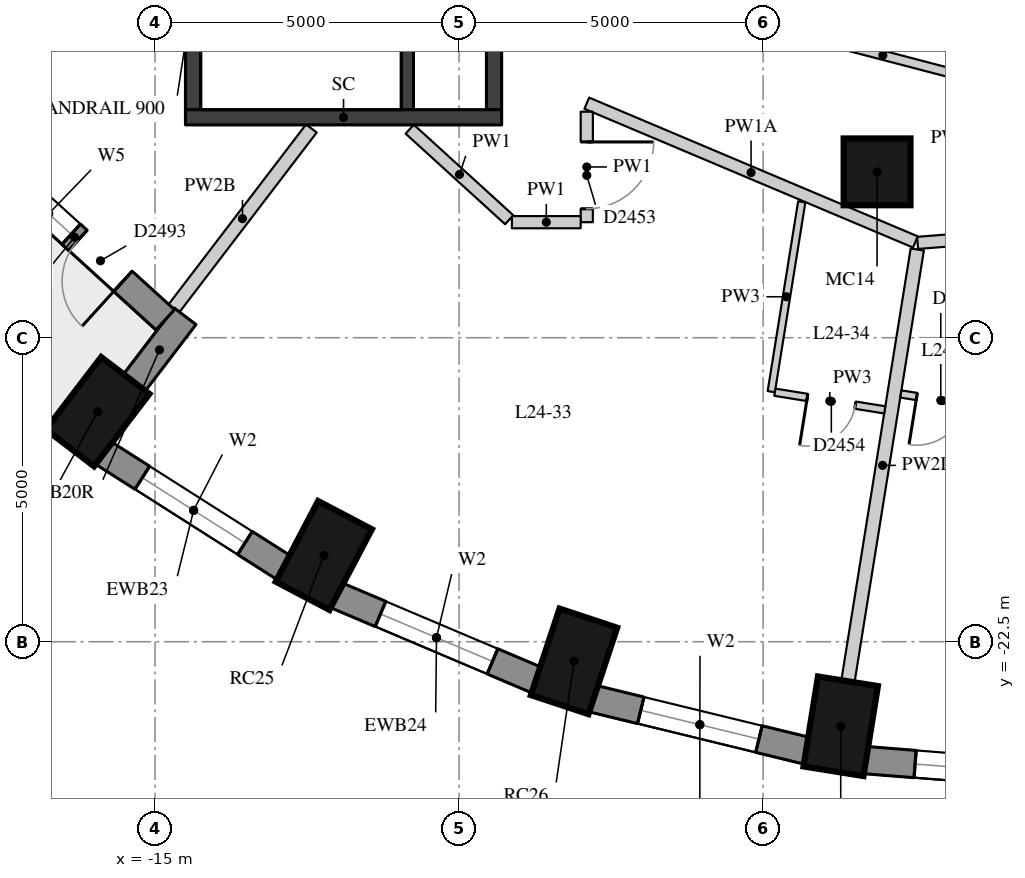
"""IFC4 building model, lengths in metres.
Left out: names, types, materials, properties, quantities, classifications, styles, units other than length and angle.
Written with IfcOpenShell. Run it as: python <this file> out.ifc"""

import sys

from ifc_helpers import new_model, si_unit, direction, frame, frame_2d, origin, origin_2d, place, context, subcontext, project, spatial, rectangle, extrude, element, fill, save


model = new_model("IFC4")
c1 = context("Model", 3, precision=1e-05, world=origin(), true_north=direction((0.0, 1.0)))
c2 = subcontext(c1, "Body", "Model", "MODEL_VIEW")
j1 = project(units=[si_unit("LENGTHUNIT", "METRE"), si_unit("PLANEANGLEUNIT", "RADIAN")], contexts=[c1])
p1 = place(None, origin())
s1 = spatial("IfcSite", under=j1, at=p1, CompositionType="ELEMENT")
p2 = place(p1, origin())
s2 = spatial("IfcBuilding", under=s1, at=p2, CompositionType="ELEMENT")
p3 = place(p2, frame((0.0, 0.0, 88.9)))
s3 = spatial("IfcBuildingStorey", under=s2, at=p3, CompositionType="ELEMENT", Elevation=88.9)
for number, where, z_axis, x_axis in (
    (1, (-15.945, -18.717, 0.0), (0.0, 0.0, 1.0), (-0.607, -0.795, 0.0)),
    (2, (-12.225, -21.082, 0.0), (0.0, 0.0, 1.0), (-0.465, -0.885, 0.0)),
    (3, (-8.11, -22.824, 0.0), (0.0, 0.0, 1.0), (-0.315, -0.949, 0.0)),
    (4, (-3.724, -23.891, 0.0), (0.0, 0.0, 1.0), (-0.159, -0.987, 0.0)),
):
    element("IfcColumn", number, at=place(p3, frame(where, z_axis=z_axis, x_axis=x_axis)), inside=s3, PredefinedType="COLUMN", context=c2, shape_type="SweptSolid", body=[
        extrude(rectangle(XDim=1.5, YDim=1.0, at=origin_2d()), origin(), (0.0, 0.0, 1.0), 3.3),
    ])
p4 = place(p3, frame((-3.126, -14.772, 0.0), z_axis=(0.0, 0.0, 1.0), x_axis=(1.0, 0.0, 0.0)))
e5 = element("IfcColumn", 5, at=p4, inside=s3, PredefinedType="COLUMN", context=c2, shape_type="SweptSolid", body=[
    extrude(rectangle(XDim=1.1, YDim=1.1, at=origin_2d()), origin(), (0.0, 0.0, 1.0), 3.3),
])
p5 = place(p3, frame((-15.856, -19.392, 0.0), z_axis=(0.0, 0.0, 1.0), x_axis=(0.843891947083, -0.53651317006, 0.0)))
e6 = element("IfcWall", 6, at=p5, inside=s3, PredefinedType="SOLIDWALL", context=c2, shape_type="SweptSolid", body=[
    extrude(rectangle(XDim=3.532, YDim=0.45, at=frame_2d((1.766, 0.0))), origin(), (0.0, 0.0, 1.0), 3.02),
])
p6 = place(p5, frame((0.766, 0.0, 0.4)))
e7 = element("IfcOpeningElement", 7, at=p6, cuts=e6, PredefinedType="OPENING", context=c2, shape_type="SweptSolid", body=[
    extrude(rectangle(XDim=2.0, YDim=1.75, at=frame_2d((1.0, 0.875))), frame((0.0, 0.235, 0.0), z_axis=(0.0, -1.0, 0.0), x_axis=(1.0, 0.0, 0.0)), (0.0, 0.0, 1.0), 0.47),
])
p7 = place(p3, frame((-12.025, -21.733, 0.0), z_axis=(0.0, 0.0, 1.0), x_axis=(0.920879975612, -0.389846213932, 0.0)))
e8 = element("IfcWall", 8, at=p7, inside=s3, PredefinedType="SOLIDWALL", context=c2, shape_type="SweptSolid", body=[
    extrude(rectangle(XDim=3.592, YDim=0.45, at=frame_2d((1.796, 0.0))), origin(), (0.0, 0.0, 1.0), 3.02),
])
p8 = place(p7, frame((0.796, 0.0, 0.4)))
e9 = element("IfcOpeningElement", 9, at=p8, cuts=e8, PredefinedType="OPENING", context=c2, shape_type="SweptSolid", body=[
    extrude(rectangle(XDim=2.0, YDim=1.75, at=frame_2d((1.0, 0.875))), frame((0.0, 0.235, 0.0), z_axis=(0.0, -1.0, 0.0), x_axis=(1.0, 0.0, 0.0)), (0.0, 0.0, 1.0), 0.47),
])
p9 = place(p3, frame((-7.807, -23.435, 0.0), z_axis=(0.0, 0.0, 1.0), x_axis=(0.971667603162, -0.236351579148, 0.0)))
e10 = element("IfcWall", 10, at=p9, inside=s3, PredefinedType="SOLIDWALL", context=c2, shape_type="SweptSolid", body=[
    extrude(rectangle(XDim=3.635, YDim=0.45, at=frame_2d((1.817, 0.0))), origin(), (0.0, 0.0, 1.0), 3.02),
])
p10 = place(p9, frame((0.817, 0.0, 0.4)))
e11 = element("IfcOpeningElement", 11, at=p10, cuts=e10, PredefinedType="OPENING", context=c2, shape_type="SweptSolid", body=[
    extrude(rectangle(XDim=2.0, YDim=1.75, at=frame_2d((1.0, 0.875))), frame((0.0, 0.235, 0.0), z_axis=(0.0, -1.0, 0.0), x_axis=(1.0, 0.0, 0.0)), (0.0, 0.0, 1.0), 0.47),
])
p11 = place(p3, frame((-3.327, -24.447, 0.0), z_axis=(0.0, 0.0, 1.0), x_axis=(0.996862216754, -0.079156306178, 0.0)))
e12 = element("IfcWall", 12, at=p11, inside=s3, PredefinedType="SOLIDWALL", context=c2, shape_type="SweptSolid", body=[
    extrude(rectangle(XDim=3.658, YDim=0.45, at=frame_2d((1.829, 0.0))), origin(), (0.0, 0.0, 1.0), 3.02),
])
p12 = place(p11, frame((0.829, 0.0, 0.4)))
e13 = element("IfcOpeningElement", 13, at=p12, cuts=e12, PredefinedType="OPENING", context=c2, shape_type="SweptSolid", body=[
    extrude(rectangle(XDim=2.0, YDim=1.75, at=frame_2d((1.0, 0.875))), frame((0.0, 0.235, 0.0), z_axis=(0.0, -1.0, 0.0), x_axis=(1.0, 0.0, 0.0)), (0.0, 0.0, 1.0), 0.47),
])
p13 = place(p3, frame((-15.35, -18.253, 0.0), z_axis=(0.0, 0.0, 1.0), x_axis=(0.607026495834, 0.794681592435, 0.0)))
e14 = element("IfcWall", 14, at=p13, inside=s3, PredefinedType="SOLIDWALL", context=c2, shape_type="SweptSolid", body=[
    extrude(rectangle(XDim=1.391, YDim=0.45, at=frame_2d((0.695, 0.0))), origin(), (0.0, 0.0, 1.0), 2.57),
])
p14 = place(p3, frame((-17.814, -14.491, 0.0), z_axis=(0.0, 0.0, 1.0), x_axis=(0.73951517403, -0.673139886933, 0.0)))
e15 = element("IfcWall", 15, at=p14, inside=s3, PredefinedType="SOLIDWALL", context=c2, shape_type="SweptSolid", body=[
    extrude(rectangle(XDim=4.031, YDim=0.45, at=frame_2d((2.016, 0.0))), origin(), (0.0, 0.0, 1.0), 3.02),
])
p15 = place(p14, frame((0.941, 0.0, 0.4)))
e16 = element("IfcOpeningElement", 16, at=p15, cuts=e15, PredefinedType="OPENING", context=c2, shape_type="SweptSolid", body=[
    extrude(rectangle(XDim=1.0, YDim=1.75, at=frame_2d((0.5, 0.875))), frame((0.0, 0.235, 0.0), z_axis=(0.0, -1.0, 0.0), x_axis=(1.0, 0.0, 0.0)), (0.0, 0.0, 1.0), 0.47),
])
p16 = place(p14, frame((2.091, 0.0, 0.0)))
e17 = element("IfcOpeningElement", 17, at=p16, cuts=e15, PredefinedType="OPENING", context=c2, shape_type="SweptSolid", body=[
    extrude(rectangle(XDim=1.0, YDim=2.15, at=frame_2d((0.5, 1.075))), frame((0.0, 0.235, 0.0), z_axis=(0.0, -1.0, 0.0), x_axis=(1.0, 0.0, 0.0)), (0.0, 0.0, 1.0), 0.47),
])
p17 = place(p3, frame((-10.85, -13.75, 0.0), z_axis=(0.0, 0.0, 1.0), x_axis=(0.0, 1.0, 0.0)))
e18 = element("IfcWall", 18, at=p17, inside=s3, PredefinedType="SHEAR", context=c2, shape_type="SweptSolid", body=[
    extrude(rectangle(XDim=6.0, YDim=0.2, at=frame_2d((3.0, 0.0))), origin(), (0.0, 0.0, 1.0), 3.02),
])
p18 = place(p17, frame((4.4, 0.0, 0.0)))
e19 = element("IfcOpeningElement", 19, at=p18, cuts=e18, PredefinedType="OPENING", context=c2, shape_type="SweptSolid", body=[
    extrude(rectangle(XDim=1.5, YDim=2.1, at=frame_2d((0.75, 1.05))), frame((0.0, 0.11, 0.0), z_axis=(0.0, -1.0, 0.0), x_axis=(1.0, 0.0, 0.0)), (0.0, 0.0, 1.0), 0.22),
])
p19 = place(p3, frame((-14.375, -13.75, -0.28), z_axis=(0.0, 0.0, 1.0), x_axis=(0.0, 1.0, 0.0)))
e20 = element("IfcWall", 20, at=p19, inside=s3, PredefinedType="SHEAR", context=c2, shape_type="SweptSolid", body=[
    extrude(rectangle(XDim=6.0, YDim=0.25, at=frame_2d((3.0, 0.0))), origin(), (0.0, 0.0, 1.0), 3.3),
])
p20 = place(p3, frame((-9.425, -13.75, -0.28), z_axis=(0.0, 0.0, 1.0), x_axis=(0.0, 1.0, 0.0)))
e21 = element("IfcWall", 21, at=p20, inside=s3, PredefinedType="SHEAR", context=c2, shape_type="SweptSolid", body=[
    extrude(rectangle(XDim=6.0, YDim=0.25, at=frame_2d((3.0, 0.0))), origin(), (0.0, 0.0, 1.0), 3.3),
])
p21 = place(p20, frame((2.4, 0.0, 0.28)))
e22 = element("IfcOpeningElement", 22, at=p21, cuts=e21, PredefinedType="OPENING", context=c2, shape_type="SweptSolid", body=[
    extrude(rectangle(XDim=1.5, YDim=2.1, at=frame_2d((0.75, 1.05))), frame((0.0, 0.135, 0.0), z_axis=(0.0, -1.0, 0.0), x_axis=(1.0, 0.0, 0.0)), (0.0, 0.0, 1.0), 0.27),
])
p22 = place(p3, frame((-14.5, -13.875, -0.28), z_axis=(0.0, 0.0, 1.0), x_axis=(1.0, 0.0, 0.0)))
e23 = element("IfcWall", 23, at=p22, inside=s3, PredefinedType="SHEAR", context=c2, shape_type="SweptSolid", body=[
    extrude(rectangle(XDim=5.2, YDim=0.25, at=frame_2d((2.6, 0.0))), origin(), (0.0, 0.0, 1.0), 3.3),
])
p23 = place(p3, frame((7.158, -15.178, 0.0), z_axis=(0.0, 0.0, 1.0), x_axis=(-0.996871915552, -0.0790340685, 0.0)))
e24 = element("IfcWall", 24, at=p23, inside=s3, PredefinedType="PARTITIONING", context=c2, shape_type="SweptSolid", body=[
    extrude(rectangle(XDim=9.647, YDim=0.2, at=frame_2d((4.824, 0.0))), origin(), (0.0, 0.0, 1.0), 3.02),
])
p24 = place(p23, frame((6.588, 0.0, 0.0)))
e25 = element("IfcOpeningElement", 25, at=p24, cuts=e24, PredefinedType="OPENING", context=c2, shape_type="SweptSolid", body=[
    extrude(rectangle(XDim=1.0, YDim=2.1, at=frame_2d((0.5, 1.05))), frame((0.0, 0.11, 0.0), z_axis=(0.0, -1.0, 0.0), x_axis=(1.0, 0.0, 0.0)), (0.0, 0.0, 1.0), 0.22),
])
p25 = place(p23, frame((4.855, 0.0, 0.0)))
e26 = element("IfcOpeningElement", 26, at=p25, cuts=e24, PredefinedType="OPENING", context=c2, shape_type="SweptSolid", body=[
    extrude(rectangle(XDim=0.9, YDim=2.1, at=frame_2d((0.45, 1.05))), frame((0.0, 0.11, 0.0), z_axis=(0.0, -1.0, 0.0), x_axis=(1.0, 0.0, 0.0)), (0.0, 0.0, 1.0), 0.22),
])
p26 = place(p23, frame((0.22, 0.0, 0.0)))
e27 = element("IfcOpeningElement", 27, at=p26, cuts=e24, PredefinedType="OPENING", context=c2, shape_type="SweptSolid", body=[
    extrude(rectangle(XDim=1.1, YDim=2.1, at=frame_2d((0.55, 1.05))), frame((0.0, 0.11, 0.0), z_axis=(0.0, -1.0, 0.0), x_axis=(1.0, 0.0, 0.0)), (0.0, 0.0, 1.0), 0.22),
])
p27 = place(p3, frame((-2.496, -15.925, 0.0), z_axis=(0.0, 0.0, 1.0), x_axis=(-0.921239287596, 0.388996368864, 0.0)))
e28 = element("IfcWall", 28, at=p27, inside=s3, PredefinedType="PARTITIONING", context=c2, shape_type="SweptSolid", body=[
    extrude(rectangle(XDim=5.866, YDim=0.2, at=frame_2d((2.933, 0.0))), origin(), (0.0, 0.0, 1.0), 2.57),
])
p28 = place(p3, frame((-7.9, -13.783, 0.0), z_axis=(0.0, 0.0, 1.0), x_axis=(0.0, -1.0, 0.0)))
e29 = element("IfcWall", 29, at=p28, inside=s3, PredefinedType="PARTITIONING", context=c2, shape_type="SweptSolid", body=[
    extrude(rectangle(XDim=1.817, YDim=0.2, at=frame_2d((0.908, 0.0))), origin(), (0.0, 0.0, 1.0), 3.02),
])
p29 = place(p28, frame((0.497, 0.0, 0.0)))
e30 = element("IfcOpeningElement", 30, at=p29, cuts=e29, PredefinedType="OPENING", context=c2, shape_type="SweptSolid", body=[
    extrude(rectangle(XDim=1.1, YDim=2.1, at=frame_2d((0.55, 1.05))), frame((0.0, 0.11, 0.0), z_axis=(0.0, -1.0, 0.0), x_axis=(1.0, 0.0, 0.0)), (0.0, 0.0, 1.0), 0.22),
])
p30 = place(p3, frame((-8.0, -15.6, 0.0), z_axis=(0.0, 0.0, 1.0), x_axis=(-1.0, 0.0, 0.0)))
e31 = element("IfcWall", 31, at=p30, inside=s3, PredefinedType="PARTITIONING", context=c2, shape_type="SweptSolid", body=[
    extrude(rectangle(XDim=1.131, YDim=0.2, at=frame_2d((0.565, 0.0))), origin(), (0.0, 0.0, 1.0), 3.02),
])
p31 = place(p3, frame((-9.176, -15.56, 0.0), z_axis=(0.0, 0.0, 1.0), x_axis=(-0.73943556447, 0.673227336044, 0.0)))
e32 = element("IfcWall", 32, at=p31, inside=s3, PredefinedType="PARTITIONING", context=c2, shape_type="SweptSolid", body=[
    extrude(rectangle(XDim=2.212, YDim=0.2, at=frame_2d((1.106, 0.0))), origin(), (0.0, 0.0, 1.0), 3.02),
])
p32 = place(p3, frame((-1.644, -13.217, 0.0), z_axis=(0.0, 0.0, 1.0), x_axis=(-0.967446197993, 0.253076774891, 0.0)))
e33 = element("IfcWall", 33, at=p32, inside=s3, PredefinedType="PARTITIONING", context=c2, shape_type="SweptSolid", body=[
    extrude(rectangle(XDim=2.868, YDim=0.15, at=frame_2d((1.434, 0.0))), origin(), (0.0, 0.0, 1.0), 3.02),
])
p33 = place(p3, frame((-14.696, -17.025, 0.0), z_axis=(0.0, 0.0, 1.0), x_axis=(0.607059278405, 0.794656550028, 0.0)))
e34 = element("IfcWall", 34, at=p33, inside=s3, PredefinedType="PARTITIONING", context=c2, shape_type="SweptSolid", body=[
    extrude(rectangle(XDim=3.734, YDim=0.22, at=frame_2d((1.867, 0.0))), origin(), (0.0, 0.0, 1.0), 2.57),
])
p34 = place(p3, frame((-3.605, -23.15, 0.0), z_axis=(0.0, 0.0, 1.0), x_axis=(0.158533314299, 0.987353628776, 0.0)))
e35 = element("IfcWall", 35, at=p34, inside=s3, PredefinedType="PARTITIONING", context=c2, shape_type="SweptSolid", body=[
    extrude(rectangle(XDim=7.192, YDim=0.22, at=frame_2d((3.596, 0.0))), origin(), (0.0, 0.0, 1.0), 2.47),
])
p35 = place(p3, frame((-4.365, -15.266, 0.0), z_axis=(0.0, 0.0, 1.0), x_axis=(-0.158535604942, -0.987353260979, 0.0)))
e36 = element("IfcWall", 36, at=p35, inside=s3, PredefinedType="PARTITIONING", context=c2, shape_type="SweptSolid", body=[
    extrude(rectangle(XDim=3.162, YDim=0.12, at=frame_2d((1.581, 0.0))), origin(), (0.0, 0.0, 1.0), 3.02),
])
p36 = place(p3, frame((-4.806, -18.397, 0.0), z_axis=(0.0, 0.0, 1.0), x_axis=(0.987339700129, -0.158620038299, 0.0)))
e37 = element("IfcWall", 37, at=p36, inside=s3, PredefinedType="PARTITIONING", context=c2, shape_type="SweptSolid", body=[
    extrude(rectangle(XDim=1.83, YDim=0.12, at=frame_2d((0.915, 0.0))), origin(), (0.0, 0.0, 1.0), 3.02),
])
p37 = place(p36, frame((0.54, 0.0, 0.0)))
e38 = element("IfcOpeningElement", 38, at=p37, cuts=e37, PredefinedType="OPENING", context=c2, shape_type="SweptSolid", body=[
    extrude(rectangle(XDim=0.8, YDim=2.1, at=frame_2d((0.4, 1.05))), frame((0.0, 0.07, 0.0), z_axis=(0.0, -1.0, 0.0), x_axis=(1.0, 0.0, 0.0)), (0.0, 0.0, 1.0), 0.14),
])
p38 = place(p3, frame((-1.372, -18.644, 0.0), z_axis=(0.0, 0.0, 1.0), x_axis=(-0.987324430422, 0.158715056288, 0.0)))
e39 = element("IfcWall", 39, at=p38, inside=s3, PredefinedType="PARTITIONING", context=c2, shape_type="SweptSolid", body=[
    extrude(rectangle(XDim=1.38, YDim=0.12, at=frame_2d((0.69, 0.0))), origin(), (0.0, 0.0, 1.0), 3.02),
])
p39 = place(p38, frame((0.315, 0.0, 0.0)))
e40 = element("IfcOpeningElement", 40, at=p39, cuts=e39, PredefinedType="OPENING", context=c2, shape_type="SweptSolid", body=[
    extrude(rectangle(XDim=0.8, YDim=2.1, at=frame_2d((0.4, 1.05))), frame((0.0, 0.07, 0.0), z_axis=(0.0, -1.0, 0.0), x_axis=(1.0, 0.0, 0.0)), (0.0, 0.0, 1.0), 0.14),
])
p40 = place(p6, origin())
e41 = element("IfcWindow", 41, at=p40, inside=s3, PartitioningType="SINGLE_PANEL", PredefinedType="WINDOW", context=c2, shape_type="SweptSolid", body=[
    extrude(rectangle(XDim=2.0, YDim=1.75, at=frame_2d((1.0, 0.875))), frame((0.0, 0.035, 0.0), z_axis=(0.0, -1.0, 0.0), x_axis=(1.0, 0.0, 0.0)), (0.0, 0.0, 1.0), 0.06),
])
fill(e7, e41)
p41 = place(p8, origin())
e42 = element("IfcWindow", 42, at=p41, inside=s3, PartitioningType="SINGLE_PANEL", PredefinedType="WINDOW", context=c2, shape_type="SweptSolid", body=[
    extrude(rectangle(XDim=2.0, YDim=1.75, at=frame_2d((1.0, 0.875))), frame((0.0, 0.035, 0.0), z_axis=(0.0, -1.0, 0.0), x_axis=(1.0, 0.0, 0.0)), (0.0, 0.0, 1.0), 0.06),
])
fill(e9, e42)
p42 = place(p10, origin())
e43 = element("IfcWindow", 43, at=p42, inside=s3, PartitioningType="SINGLE_PANEL", PredefinedType="WINDOW", context=c2, shape_type="SweptSolid", body=[
    extrude(rectangle(XDim=2.0, YDim=1.75, at=frame_2d((1.0, 0.875))), frame((0.0, 0.035, 0.0), z_axis=(0.0, -1.0, 0.0), x_axis=(1.0, 0.0, 0.0)), (0.0, 0.0, 1.0), 0.06),
])
fill(e11, e43)
p43 = place(p12, origin())
e44 = element("IfcWindow", 44, at=p43, inside=s3, PartitioningType="SINGLE_PANEL", PredefinedType="WINDOW", context=c2, shape_type="SweptSolid", body=[
    extrude(rectangle(XDim=2.0, YDim=1.75, at=frame_2d((1.0, 0.875))), frame((0.0, 0.035, 0.0), z_axis=(0.0, -1.0, 0.0), x_axis=(1.0, 0.0, 0.0)), (0.0, 0.0, 1.0), 0.06),
])
fill(e13, e44)
p44 = place(p15, origin())
e45 = element("IfcWindow", 45, at=p44, inside=s3, PartitioningType="SINGLE_PANEL", PredefinedType="WINDOW", context=c2, shape_type="SweptSolid", body=[
    extrude(rectangle(XDim=1.0, YDim=1.75, at=frame_2d((0.5, 0.875))), frame((0.0, 0.035, 0.0), z_axis=(0.0, -1.0, 0.0), x_axis=(1.0, 0.0, 0.0)), (0.0, 0.0, 1.0), 0.06),
])
fill(e16, e45)
p45 = place(p16, frame((1.0, 0.0, 0.0), z_axis=(0.0, 0.0, 1.0), x_axis=(-1.0, 0.0, 0.0)))
e46 = element("IfcDoor", 46, at=p45, inside=s3, OperationType="SINGLE_SWING_LEFT", PredefinedType="DOOR", context=c2, shape_type="SweptSolid", body=[
    extrude(rectangle(XDim=1.0, YDim=2.15, at=frame_2d((0.5, 1.075))), frame((0.0, 0.075, 0.0), z_axis=(0.0, -1.0, 0.0), x_axis=(1.0, 0.0, 0.0)), (0.0, 0.0, 1.0), 0.05),
])
fill(e17, e46)
p46 = place(p29, origin())
e47 = element("IfcDoor", 47, at=p46, inside=s3, OperationType="SINGLE_SWING_LEFT", PredefinedType="DOOR", context=c2, shape_type="SweptSolid", body=[
    extrude(rectangle(XDim=1.1, YDim=2.1, at=frame_2d((0.55, 1.05))), frame((0.0, 0.025, 0.0), z_axis=(0.0, -1.0, 0.0), x_axis=(1.0, 0.0, 0.0)), (0.0, 0.0, 1.0), 0.05),
])
fill(e30, e47)
p47 = place(p37, origin())
e48 = element("IfcDoor", 48, at=p47, inside=s3, OperationType="SINGLE_SWING_RIGHT", PredefinedType="DOOR", context=c2, shape_type="SweptSolid", body=[
    extrude(rectangle(XDim=0.8, YDim=2.1, at=frame_2d((0.4, 1.05))), frame((0.0, 0.025, 0.0), z_axis=(0.0, -1.0, 0.0), x_axis=(1.0, 0.0, 0.0)), (0.0, 0.0, 1.0), 0.05),
])
fill(e38, e48)
p48 = place(p39, origin())
e49 = element("IfcDoor", 49, at=p48, inside=s3, OperationType="SINGLE_SWING_RIGHT", PredefinedType="DOOR", context=c2, shape_type="SweptSolid", body=[
    extrude(rectangle(XDim=0.8, YDim=2.1, at=frame_2d((0.4, 1.05))), frame((0.0, 0.025, 0.0), z_axis=(0.0, -1.0, 0.0), x_axis=(1.0, 0.0, 0.0)), (0.0, 0.0, 1.0), 0.05),
])
fill(e40, e49)
save(model, sys.argv[1])
